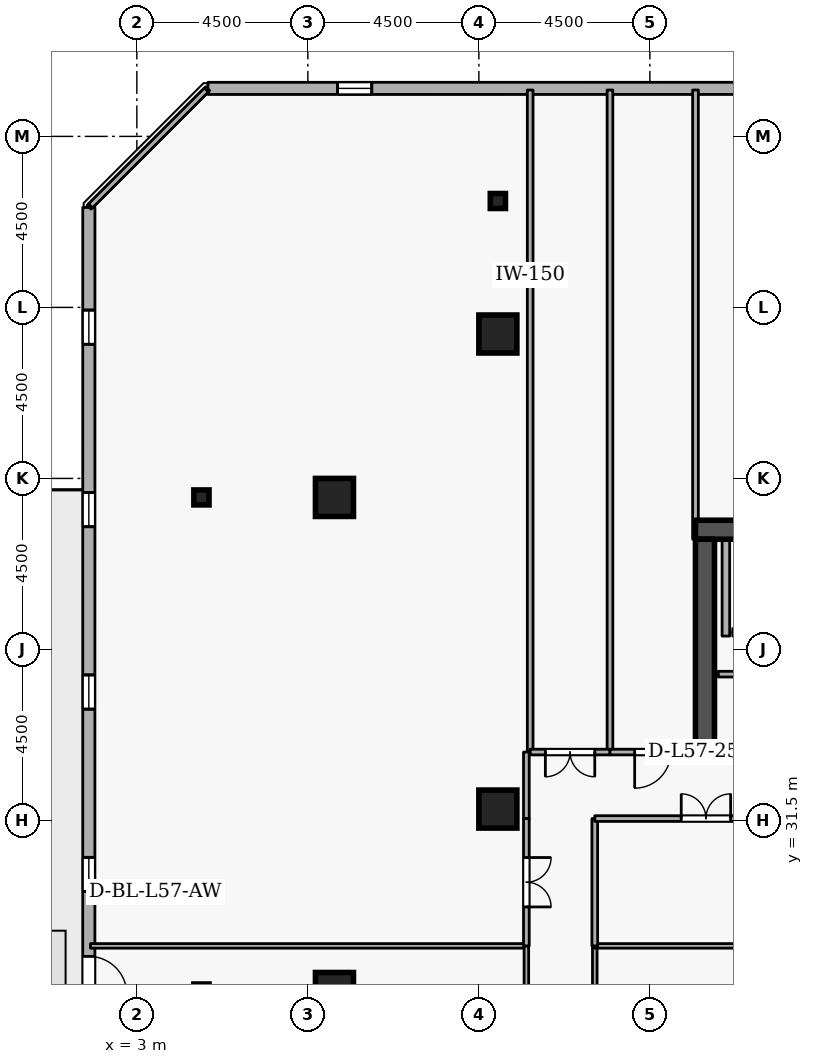
"""IFC4 building model, lengths in metres.
Left out: names, types, materials, properties, quantities, classifications, styles, units other than length and angle.
Written with IfcOpenShell. Run it as: python <this file> out.ifc"""

import sys

from ifc_helpers import new_model, si_unit, direction, frame, frame_2d, origin, origin_2d, place, context, subcontext, project, spatial, rectangle, i_section, extrude, element, fill, save


model = new_model("IFC4")
c1 = context("Model", 3, precision=1e-05, world=origin(), true_north=direction((0.0, 1.0)))
c2 = subcontext(c1, "Body", "Model", "MODEL_VIEW")
j1 = project(units=[si_unit("LENGTHUNIT", "METRE"), si_unit("PLANEANGLEUNIT", "RADIAN")], contexts=[c1])
p1 = place(None, origin())
s1 = spatial("IfcSite", under=j1, at=p1, CompositionType="ELEMENT")
p2 = place(p1, origin())
s2 = spatial("IfcBuilding", under=s1, at=p2, CompositionType="ELEMENT")
p3 = place(p2, frame((0.0, 0.0, 214.5)))
s3 = spatial("IfcBuildingStorey", under=s2, at=p3, CompositionType="ELEMENT", Elevation=214.5)
p4 = place(p3, frame((17.7, 39.15, 0.0), z_axis=(0.0, 0.0, 1.0), x_axis=(1.0, 0.0, 0.0)))
e1 = element("IfcWall", 1, at=p4, inside=s3, PredefinedType="SHEAR", context=c2, shape_type="SweptSolid", body=[
    extrude(rectangle(XDim=15.6, YDim=0.5, at=frame_2d((7.8, 0.0))), origin(), (0.0, 0.0, 1.0), 3.6),
])
p5 = place(p3, frame((17.95, 33.1, 0.0), z_axis=(0.0, 0.0, 1.0), x_axis=(0.0, 1.0, 0.0)))
e2 = element("IfcWall", 2, at=p5, inside=s3, PredefinedType="SHEAR", context=c2, shape_type="SweptSolid", body=[
    extrude(rectangle(XDim=5.8, YDim=0.5, at=frame_2d((2.9, 0.0))), origin(), (0.0, 0.0, 1.0), 3.6),
])
for number, where, z_axis, x_axis in (
    (3, (12.5, 44.3, 0.0), (0.0, 0.0, 1.0), (1.0, 0.0, 0.0)),
    (4, (8.2, 27.0, 0.0), (0.0, 0.0, 1.0), (1.0, 0.0, 0.0)),
    (5, (8.2, 40.0, 0.0), (0.0, 0.0, 1.0), (1.0, 0.0, 0.0)),
    (6, (12.5, 31.8, 0.0), (0.0, 0.0, 1.0), (1.0, 0.0, 0.0)),
):
    element("IfcColumn", number, at=place(p3, frame(where, z_axis=z_axis, x_axis=x_axis)), inside=s3, PredefinedType="COLUMN", context=c2, shape_type="SweptSolid", body=[
        extrude(rectangle(XDim=1.0, YDim=1.0, at=origin_2d()), origin(), (0.0, 0.0, 1.0), 3.6),
    ])
for number, where, z_axis, x_axis in (
    (7, (12.5, 47.8, 0.0), (0.0, 0.0, 1.0), (1.0, 0.0, 0.0)),
    (8, (4.7, 40.0, 0.0), (0.0, 0.0, 1.0), (1.0, 0.0, 0.0)),
):
    element("IfcColumn", number, at=place(p3, frame(where, z_axis=z_axis, x_axis=x_axis)), inside=s3, PredefinedType="COLUMN", context=c2, shape_type="SweptSolid", body=[
        extrude(i_section(OverallWidth=0.399, OverallDepth=0.394, WebThickness=0.023, FlangeThickness=0.037, FilletRadius=0.015, at=origin_2d()), origin(), (0.0, 0.0, 1.0), 3.6),
    ])
p6 = place(p3, frame((40.681, 50.765, 0.0), z_axis=(0.0, 0.0, 1.0), x_axis=(-0.999999998513, -5.4540124e-05, 0.0)))
e9 = element("IfcWall", 9, at=p6, inside=s3, PredefinedType="STANDARD", context=c2, shape_type="SweptSolid", body=[
    extrude(rectangle(XDim=35.811, YDim=0.32, at=frame_2d((17.905, 0.0))), origin(), (0.0, 0.0, 1.0), 2.7),
])
p7 = place(p6, frame((2.7, 0.0, 0.72)))
e10 = element("IfcOpeningElement", 10, at=p7, cuts=e9, PredefinedType="OPENING", context=c2, shape_type="SweptSolid", body=[
    extrude(rectangle(XDim=0.9, YDim=1.75, at=frame_2d((0.45, 0.875))), frame((0.0, 0.17, 0.0), z_axis=(0.0, -1.0, 0.0), x_axis=(1.0, 0.0, 0.0)), (0.0, 0.0, 1.0), 0.34),
])
p8 = place(p6, frame((7.5, 0.0, 0.72)))
e11 = element("IfcOpeningElement", 11, at=p8, cuts=e9, PredefinedType="OPENING", context=c2, shape_type="SweptSolid", body=[
    extrude(rectangle(XDim=0.9, YDim=1.75, at=frame_2d((0.45, 0.875))), frame((0.0, 0.17, 0.0), z_axis=(0.0, -1.0, 0.0), x_axis=(1.0, 0.0, 0.0)), (0.0, 0.0, 1.0), 0.34),
])
p9 = place(p6, frame((12.3, 0.0, 0.72)))
e12 = element("IfcOpeningElement", 12, at=p9, cuts=e9, PredefinedType="OPENING", context=c2, shape_type="SweptSolid", body=[
    extrude(rectangle(XDim=0.9, YDim=1.75, at=frame_2d((0.45, 0.875))), frame((0.0, 0.17, 0.0), z_axis=(0.0, -1.0, 0.0), x_axis=(1.0, 0.0, 0.0)), (0.0, 0.0, 1.0), 0.34),
])
p10 = place(p6, frame((17.1, 0.0, 0.72)))
e13 = element("IfcOpeningElement", 13, at=p10, cuts=e9, PredefinedType="OPENING", context=c2, shape_type="SweptSolid", body=[
    extrude(rectangle(XDim=0.9, YDim=1.75, at=frame_2d((0.45, 0.875))), frame((0.0, 0.17, 0.0), z_axis=(0.0, -1.0, 0.0), x_axis=(1.0, 0.0, 0.0)), (0.0, 0.0, 1.0), 0.34),
])
p11 = place(p6, frame((31.5, 0.0, 0.72)))
e14 = element("IfcOpeningElement", 14, at=p11, cuts=e9, PredefinedType="OPENING", context=c2, shape_type="SweptSolid", body=[
    extrude(rectangle(XDim=0.9, YDim=1.75, at=frame_2d((0.45, 0.875))), frame((0.0, 0.17, 0.0), z_axis=(0.0, -1.0, 0.0), x_axis=(1.0, 0.0, 0.0)), (0.0, 0.0, 1.0), 0.34),
])
p12 = place(p3, frame((1.737, 47.629, 0.0), z_axis=(0.0, 0.0, 1.0), x_axis=(-5.4540124e-05, -0.999999998513, 0.0)))
e15 = element("IfcWall", 15, at=p12, inside=s3, PredefinedType="STANDARD", context=c2, shape_type="SweptSolid", body=[
    extrude(rectangle(XDim=35.811, YDim=0.32, at=frame_2d((17.905, 0.0))), origin(), (0.0, 0.0, 1.0), 2.7),
])
p13 = place(p12, frame((19.706, 0.0, 0.0)))
e16 = element("IfcOpeningElement", 16, at=p13, cuts=e15, PredefinedType="OPENING", context=c2, shape_type="SweptSolid", body=[
    extrude(rectangle(XDim=1.0, YDim=2.08, at=frame_2d((0.5, 1.04))), frame((0.0, 0.17, 0.0), z_axis=(0.0, -1.0, 0.0), x_axis=(1.0, 0.0, 0.0)), (0.0, 0.0, 1.0), 0.34),
])
p14 = place(p12, frame((2.7, 0.0, 0.72)))
e17 = element("IfcOpeningElement", 17, at=p14, cuts=e15, PredefinedType="OPENING", context=c2, shape_type="SweptSolid", body=[
    extrude(rectangle(XDim=0.9, YDim=1.75, at=frame_2d((0.45, 0.875))), frame((0.0, 0.17, 0.0), z_axis=(0.0, -1.0, 0.0), x_axis=(1.0, 0.0, 0.0)), (0.0, 0.0, 1.0), 0.34),
])
p15 = place(p12, frame((7.5, 0.0, 0.72)))
e18 = element("IfcOpeningElement", 18, at=p15, cuts=e15, PredefinedType="OPENING", context=c2, shape_type="SweptSolid", body=[
    extrude(rectangle(XDim=0.9, YDim=1.75, at=frame_2d((0.45, 0.875))), frame((0.0, 0.17, 0.0), z_axis=(0.0, -1.0, 0.0), x_axis=(1.0, 0.0, 0.0)), (0.0, 0.0, 1.0), 0.34),
])
p16 = place(p12, frame((12.3, 0.0, 0.72)))
e19 = element("IfcOpeningElement", 19, at=p16, cuts=e15, PredefinedType="OPENING", context=c2, shape_type="SweptSolid", body=[
    extrude(rectangle(XDim=0.9, YDim=1.75, at=frame_2d((0.45, 0.875))), frame((0.0, 0.17, 0.0), z_axis=(0.0, -1.0, 0.0), x_axis=(1.0, 0.0, 0.0)), (0.0, 0.0, 1.0), 0.34),
])
p17 = place(p12, frame((17.1, 0.0, 0.72)))
e20 = element("IfcOpeningElement", 20, at=p17, cuts=e15, PredefinedType="OPENING", context=c2, shape_type="SweptSolid", body=[
    extrude(rectangle(XDim=0.9, YDim=1.75, at=frame_2d((0.45, 0.875))), frame((0.0, 0.17, 0.0), z_axis=(0.0, -1.0, 0.0), x_axis=(1.0, 0.0, 0.0)), (0.0, 0.0, 1.0), 0.34),
])
p18 = place(p12, frame((21.9, 0.0, 0.72)))
e21 = element("IfcOpeningElement", 21, at=p18, cuts=e15, PredefinedType="OPENING", context=c2, shape_type="SweptSolid", body=[
    extrude(rectangle(XDim=0.9, YDim=1.75, at=frame_2d((0.45, 0.875))), frame((0.0, 0.17, 0.0), z_axis=(0.0, -1.0, 0.0), x_axis=(1.0, 0.0, 0.0)), (0.0, 0.0, 1.0), 0.34),
])
p19 = place(p12, frame((26.7, 0.0, 0.72)))
e22 = element("IfcOpeningElement", 22, at=p19, cuts=e15, PredefinedType="OPENING", context=c2, shape_type="SweptSolid", body=[
    extrude(rectangle(XDim=0.9, YDim=1.75, at=frame_2d((0.45, 0.875))), frame((0.0, 0.17, 0.0), z_axis=(0.0, -1.0, 0.0), x_axis=(1.0, 0.0, 0.0)), (0.0, 0.0, 1.0), 0.34),
])
p20 = place(p12, frame((31.5, 0.0, 0.72)))
e23 = element("IfcOpeningElement", 23, at=p20, cuts=e15, PredefinedType="OPENING", context=c2, shape_type="SweptSolid", body=[
    extrude(rectangle(XDim=0.9, YDim=1.75, at=frame_2d((0.45, 0.875))), frame((0.0, 0.17, 0.0), z_axis=(0.0, -1.0, 0.0), x_axis=(1.0, 0.0, 0.0)), (0.0, 0.0, 1.0), 0.34),
])
p21 = place(p3, frame((20.62, 36.45, 0.0), z_axis=(0.0, 0.0, 1.0), x_axis=(-1.0, 0.0, 0.0)))
e24 = element("IfcWall", 24, at=p21, inside=s3, PredefinedType="STANDARD", context=c2, shape_type="SweptSolid", body=[
    extrude(rectangle(XDim=1.94, YDim=0.2, at=frame_2d((0.97, 0.0))), origin(), (0.0, 0.0, 1.0), 3.34),
])
p22 = place(p21, frame((0.46, 0.0, 0.0)))
e25 = element("IfcOpeningElement", 25, at=p22, cuts=e24, PredefinedType="OPENING", context=c2, shape_type="SweptSolid", body=[
    extrude(rectangle(XDim=1.02, YDim=2.06, at=frame_2d((0.51, 1.03))), frame((0.0, 0.11, 0.0), z_axis=(0.0, -1.0, 0.0), x_axis=(1.0, 0.0, 0.0)), (0.0, 0.0, 1.0), 0.22),
])
p23 = place(p3, frame((18.5, 36.352, 0.0), z_axis=(0.0, 0.0, 1.0), x_axis=(0.0, 1.0, 0.0)))
e26 = element("IfcWall", 26, at=p23, inside=s3, PredefinedType="STANDARD", context=c2, shape_type="SweptSolid", body=[
    extrude(rectangle(XDim=2.536, YDim=0.2, at=frame_2d((1.268, 0.0))), origin(), (0.0, 0.0, 1.0), 3.34),
])
p24 = place(p3, frame((18.3, 33.3, 0.0), z_axis=(0.0, 0.0, 1.0), x_axis=(1.0, 0.0, 0.0)))
e27 = element("IfcWall", 27, at=p24, inside=s3, PredefinedType="PARTITIONING", context=c2, shape_type="SweptSolid", body=[
    extrude(rectangle(XDim=2.25, YDim=0.15, at=frame_2d((1.125, 0.0))), origin(), (0.0, 0.0, 1.0), 3.34),
])
p25 = place(p24, frame((0.665, 0.0, 0.0)))
e28 = element("IfcOpeningElement", 28, at=p25, cuts=e27, PredefinedType="OPENING", context=c2, shape_type="SweptSolid", body=[
    extrude(rectangle(XDim=0.92, YDim=2.08, at=frame_2d((0.46, 1.04))), frame((0.0, 0.085, 0.0), z_axis=(0.0, -1.0, 0.0), x_axis=(1.0, 0.0, 0.0)), (0.0, 0.0, 1.0), 0.17),
])
p26 = place(p3, frame((20.55, 35.35, 0.0), z_axis=(0.0, 0.0, 1.0), x_axis=(-1.0, 0.0, 0.0)))
e29 = element("IfcWall", 29, at=p26, inside=s3, PredefinedType="PARTITIONING", context=c2, shape_type="SweptSolid", body=[
    extrude(rectangle(XDim=2.25, YDim=0.15, at=frame_2d((1.125, 0.0))), origin(), (0.0, 0.0, 1.0), 3.34),
])
for number, where, z_axis, x_axis in (
    (30, (13.35, 33.3, 0.0), (0.0, 0.0, 1.0), (0.0, 1.0, 0.0)),
    (31, (15.45, 50.72, 0.0), (0.0, 0.0, 1.0), (0.0, -1.0, 0.0)),
):
    element("IfcWall", number, at=place(p3, frame(where, z_axis=z_axis, x_axis=x_axis)), inside=s3, PredefinedType="PARTITIONING", context=c2, shape_type="SweptSolid", body=[
        extrude(rectangle(XDim=17.42, YDim=0.15, at=frame_2d((8.71, 0.0))), origin(), (0.0, 0.0, 1.0), 3.34),
    ])
p27 = place(p3, frame((15.45, 33.3, 0.0), z_axis=(0.0, 0.0, 1.0), x_axis=(-1.0, 0.0, 0.0)))
e32 = element("IfcWall", 32, at=p27, inside=s3, PredefinedType="PARTITIONING", context=c2, shape_type="SweptSolid", body=[
    extrude(rectangle(XDim=2.1, YDim=0.15, at=frame_2d((1.05, 0.0))), origin(), (0.0, 0.0, 1.0), 3.34),
])
p28 = place(p27, frame((0.4, 0.0, 0.0)))
e33 = element("IfcOpeningElement", 33, at=p28, cuts=e32, PredefinedType="OPENING", context=c2, shape_type="SweptSolid", body=[
    extrude(rectangle(XDim=1.3, YDim=2.12, at=frame_2d((0.65, 1.06))), frame((0.0, 0.085, 0.0), z_axis=(0.0, -1.0, 0.0), x_axis=(1.0, 0.0, 0.0)), (0.0, 0.0, 1.0), 0.17),
])
p29 = place(p3, frame((17.7, 50.72, 0.0), z_axis=(0.0, 0.0, 1.0), x_axis=(0.0, -1.0, 0.0)))
e34 = element("IfcWall", 34, at=p29, inside=s3, PredefinedType="PARTITIONING", context=c2, shape_type="SweptSolid", body=[
    extrude(rectangle(XDim=11.82, YDim=0.15, at=frame_2d((5.91, 0.0))), origin(), (0.0, 0.0, 1.0), 2.545),
])
p30 = place(p3, frame((17.7, 33.3, 0.0), z_axis=(0.0, 0.0, 1.0), x_axis=(-1.0, 0.0, 0.0)))
e35 = element("IfcWall", 35, at=p30, inside=s3, PredefinedType="PARTITIONING", context=c2, shape_type="SweptSolid", body=[
    extrude(rectangle(XDim=2.25, YDim=0.15, at=frame_2d((1.125, 0.0))), origin(), (0.0, 0.0, 1.0), 3.34),
])
p31 = place(p30, frame((0.65, 0.0, 0.0)))
e36 = element("IfcOpeningElement", 36, at=p31, cuts=e35, PredefinedType="OPENING", context=c2, shape_type="SweptSolid", body=[
    extrude(rectangle(XDim=0.95, YDim=2.1, at=frame_2d((0.475, 1.05))), frame((0.0, 0.085, 0.0), z_axis=(0.0, -1.0, 0.0), x_axis=(1.0, 0.0, 0.0)), (0.0, 0.0, 1.0), 0.17),
])
p32 = place(p3, frame((1.78, 28.2, 0.0), z_axis=(0.0, 0.0, 1.0), x_axis=(1.0, 0.0, 0.0)))
e37 = element("IfcWall", 37, at=p32, inside=s3, PredefinedType="PARTITIONING", context=c2, shape_type="SweptSolid", body=[
    extrude(rectangle(XDim=11.47, YDim=0.12, at=frame_2d((5.735, 0.0))), origin(), (0.0, 0.0, 1.0), 3.34),
])
p33 = place(p3, frame((13.25, 28.2, 0.0), z_axis=(0.0, 0.0, 1.0), x_axis=(0.0, -1.0, 0.0)))
e38 = element("IfcWall", 38, at=p33, inside=s3, PredefinedType="PARTITIONING", context=c2, shape_type="SweptSolid", body=[
    extrude(rectangle(XDim=5.75, YDim=0.12, at=frame_2d((2.875, 0.0))), origin(), (0.0, 0.0, 1.0), 3.34),
])
p34 = place(p33, frame((2.35, 0.0, 0.0)))
e39 = element("IfcOpeningElement", 39, at=p34, cuts=e38, PredefinedType="OPENING", context=c2, shape_type="SweptSolid", body=[
    extrude(rectangle(XDim=1.05, YDim=2.1, at=frame_2d((0.525, 1.05))), frame((0.0, 0.07, 0.0), z_axis=(0.0, -1.0, 0.0), x_axis=(1.0, 0.0, 0.0)), (0.0, 0.0, 1.0), 0.14),
])
p35 = place(p3, frame((1.78, 47.671, 0.0), z_axis=(0.0, 0.0, 1.0), x_axis=(0.707106781187, 0.707106781187, 0.0)))
e40 = element("IfcWall", 40, at=p35, inside=s3, PredefinedType="PARTITIONING", context=c2, shape_type="SweptSolid", body=[
    extrude(rectangle(XDim=4.311, YDim=0.15, at=frame_2d((2.156, 0.0))), origin(), (0.0, 0.0, 1.0), 3.34),
])
p36 = place(p3, frame((13.25, 33.3, 0.0), z_axis=(0.0, 0.0, 1.0), x_axis=(0.0, -1.0, 0.0)))
e41 = element("IfcWall", 41, at=p36, inside=s3, PredefinedType="PARTITIONING", context=c2, shape_type="SweptSolid", body=[
    extrude(rectangle(XDim=1.75, YDim=0.15, at=frame_2d((0.875, 0.0))), origin(), (0.0, 0.0, 1.0), 3.34),
])
p37 = place(p3, frame((13.25, 31.55, 0.0), z_axis=(0.0, 0.0, 1.0), x_axis=(0.0, -1.0, 0.0)))
e42 = element("IfcWall", 42, at=p37, inside=s3, PredefinedType="PARTITIONING", context=c2, shape_type="SweptSolid", body=[
    extrude(rectangle(XDim=3.35, YDim=0.15, at=frame_2d((1.675, 0.0))), origin(), (0.0, 0.0, 1.0), 3.34),
])
p38 = place(p37, frame((1.025, 0.0, 0.0)))
e43 = element("IfcOpeningElement", 43, at=p38, cuts=e42, PredefinedType="OPENING", context=c2, shape_type="SweptSolid", body=[
    extrude(rectangle(XDim=1.3, YDim=2.12, at=frame_2d((0.65, 1.06))), frame((0.0, 0.085, 0.0), z_axis=(0.0, -1.0, 0.0), x_axis=(1.0, 0.0, 0.0)), (0.0, 0.0, 1.0), 0.17),
])
p39 = place(p3, frame((15.05, 22.45, 0.0), z_axis=(0.0, 0.0, 1.0), x_axis=(0.0, 1.0, 0.0)))
e44 = element("IfcWall", 44, at=p39, inside=s3, PredefinedType="PARTITIONING", context=c2, shape_type="SweptSolid", body=[
    extrude(rectangle(XDim=5.75, YDim=0.12, at=frame_2d((2.875, 0.0))), origin(), (0.0, 0.0, 1.0), 3.34),
])
p40 = place(p3, frame((15.05, 28.2, 0.0), z_axis=(0.0, 0.0, 1.0), x_axis=(1.0, 0.0, 0.0)))
e45 = element("IfcWall", 45, at=p40, inside=s3, PredefinedType="PARTITIONING", context=c2, shape_type="SweptSolid", body=[
    extrude(rectangle(XDim=5.85, YDim=0.12, at=frame_2d((2.925, 0.0))), origin(), (0.0, 0.0, 1.0), 3.34),
])
p41 = place(p3, frame((15.05, 28.2, 0.0), z_axis=(0.0, 0.0, 1.0), x_axis=(0.0, 1.0, 0.0)))
e46 = element("IfcWall", 46, at=p41, inside=s3, PredefinedType="PARTITIONING", context=c2, shape_type="SweptSolid", body=[
    extrude(rectangle(XDim=3.35, YDim=0.15, at=frame_2d((1.675, 0.0))), origin(), (0.0, 0.0, 1.0), 3.34),
])
p42 = place(p3, frame((15.05, 31.55, 0.0), z_axis=(0.0, 0.0, 1.0), x_axis=(1.0, 0.0, 0.0)))
e47 = element("IfcWall", 47, at=p42, inside=s3, PredefinedType="PARTITIONING", context=c2, shape_type="SweptSolid", body=[
    extrude(rectangle(XDim=5.85, YDim=0.15, at=frame_2d((2.925, 0.0))), origin(), (0.0, 0.0, 1.0), 3.34),
])
p43 = place(p42, frame((2.275, 0.0, 0.0)))
e48 = element("IfcOpeningElement", 48, at=p43, cuts=e47, PredefinedType="OPENING", context=c2, shape_type="SweptSolid", body=[
    extrude(rectangle(XDim=1.3, YDim=2.12, at=frame_2d((0.65, 1.06))), frame((0.0, 0.085, 0.0), z_axis=(0.0, -1.0, 0.0), x_axis=(1.0, 0.0, 0.0)), (0.0, 0.0, 1.0), 0.17),
])
p44 = place(p11, origin())
e49 = element("IfcWindow", 49, at=p44, inside=s3, PartitioningType="SINGLE_PANEL", PredefinedType="WINDOW", context=c2, shape_type="SweptSolid", body=[
    extrude(rectangle(XDim=0.9, YDim=1.75, at=frame_2d((0.45, 0.875))), frame((0.0, 0.03, 0.0), z_axis=(0.0, -1.0, 0.0), x_axis=(1.0, 0.0, 0.0)), (0.0, 0.0, 1.0), 0.06),
])
fill(e14, e49)
p45 = place(p13, origin())
e50 = element("IfcDoor", 50, at=p45, inside=s3, OperationType="SINGLE_SWING_RIGHT", PredefinedType="DOOR", context=c2, shape_type="SweptSolid", body=[
    extrude(rectangle(XDim=1.0, YDim=2.08, at=frame_2d((0.5, 1.04))), frame((0.0, 0.025, 0.0), z_axis=(0.0, -1.0, 0.0), x_axis=(1.0, 0.0, 0.0)), (0.0, 0.0, 1.0), 0.05),
])
fill(e16, e50)
p46 = place(p14, origin())
e51 = element("IfcWindow", 51, at=p46, inside=s3, PartitioningType="SINGLE_PANEL", PredefinedType="WINDOW", context=c2, shape_type="SweptSolid", body=[
    extrude(rectangle(XDim=0.9, YDim=1.75, at=frame_2d((0.45, 0.875))), frame((0.0, 0.03, 0.0), z_axis=(0.0, -1.0, 0.0), x_axis=(1.0, 0.0, 0.0)), (0.0, 0.0, 1.0), 0.06),
])
fill(e17, e51)
p47 = place(p15, origin())
e52 = element("IfcWindow", 52, at=p47, inside=s3, PartitioningType="SINGLE_PANEL", PredefinedType="WINDOW", context=c2, shape_type="SweptSolid", body=[
    extrude(rectangle(XDim=0.9, YDim=1.75, at=frame_2d((0.45, 0.875))), frame((0.0, 0.03, 0.0), z_axis=(0.0, -1.0, 0.0), x_axis=(1.0, 0.0, 0.0)), (0.0, 0.0, 1.0), 0.06),
])
fill(e18, e52)
p48 = place(p16, origin())
e53 = element("IfcWindow", 53, at=p48, inside=s3, PartitioningType="SINGLE_PANEL", PredefinedType="WINDOW", context=c2, shape_type="SweptSolid", body=[
    extrude(rectangle(XDim=0.9, YDim=1.75, at=frame_2d((0.45, 0.875))), frame((0.0, 0.03, 0.0), z_axis=(0.0, -1.0, 0.0), x_axis=(1.0, 0.0, 0.0)), (0.0, 0.0, 1.0), 0.06),
])
fill(e19, e53)
p49 = place(p17, origin())
e54 = element("IfcWindow", 54, at=p49, inside=s3, PartitioningType="SINGLE_PANEL", PredefinedType="WINDOW", context=c2, shape_type="SweptSolid", body=[
    extrude(rectangle(XDim=0.9, YDim=1.75, at=frame_2d((0.45, 0.875))), frame((0.0, 0.03, 0.0), z_axis=(0.0, -1.0, 0.0), x_axis=(1.0, 0.0, 0.0)), (0.0, 0.0, 1.0), 0.06),
])
fill(e20, e54)
p50 = place(p28, origin())
e55 = element("IfcDoor", 55, at=p50, inside=s3, OperationType="DOUBLE_DOOR_SINGLE_SWING", PredefinedType="DOOR", context=c2, shape_type="SweptSolid", body=[
    extrude(rectangle(XDim=1.3, YDim=2.12, at=frame_2d((0.65, 1.06))), frame((0.0, 0.025, 0.0), z_axis=(0.0, -1.0, 0.0), x_axis=(1.0, 0.0, 0.0)), (0.0, 0.0, 1.0), 0.05),
])
fill(e33, e55)
p51 = place(p31, origin())
e56 = element("IfcDoor", 56, at=p51, inside=s3, OperationType="SINGLE_SWING_RIGHT", PredefinedType="DOOR", context=c2, shape_type="SweptSolid", body=[
    extrude(rectangle(XDim=0.95, YDim=2.1, at=frame_2d((0.475, 1.05))), frame((0.0, 0.025, 0.0), z_axis=(0.0, -1.0, 0.0), x_axis=(1.0, 0.0, 0.0)), (0.0, 0.0, 1.0), 0.05),
])
fill(e36, e56)
p52 = place(p38, origin())
e57 = element("IfcDoor", 57, at=p52, inside=s3, OperationType="DOUBLE_DOOR_SINGLE_SWING", PredefinedType="DOOR", context=c2, shape_type="SweptSolid", body=[
    extrude(rectangle(XDim=1.3, YDim=2.12, at=frame_2d((0.65, 1.06))), frame((0.0, 0.025, 0.0), z_axis=(0.0, -1.0, 0.0), x_axis=(1.0, 0.0, 0.0)), (0.0, 0.0, 1.0), 0.05),
])
fill(e43, e57)
p53 = place(p43, origin())
e58 = element("IfcDoor", 58, at=p53, inside=s3, OperationType="DOUBLE_DOOR_SINGLE_SWING", PredefinedType="DOOR", context=c2, shape_type="SweptSolid", body=[
    extrude(rectangle(XDim=1.3, YDim=2.12, at=frame_2d((0.65, 1.06))), frame((0.0, 0.025, 0.0), z_axis=(0.0, -1.0, 0.0), x_axis=(1.0, 0.0, 0.0)), (0.0, 0.0, 1.0), 0.05),
])
fill(e48, e58)
save(model, sys.argv[1])
